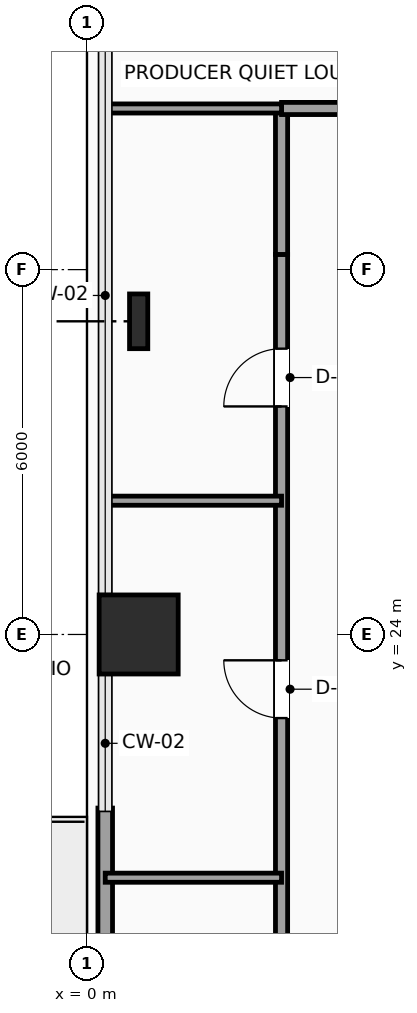
"""IFC4 building model, lengths in metres.
Left out: names, types, materials, properties, quantities, classifications, styles, units other than length and angle.
Written with IfcOpenShell. Run it as: python <this file> out.ifc"""

import sys

from ifc_helpers import new_model, si_unit, direction, frame, frame_2d, origin, origin_2d, place, context, subcontext, project, spatial, rectangle, i_section, extrude, element, fill, save


model = new_model("IFC4")
c1 = context("Model", 3, precision=1e-05, world=origin(), true_north=direction((0.0, 1.0)))
c2 = subcontext(c1, "Body", "Model", "MODEL_VIEW")
j1 = project(units=[si_unit("LENGTHUNIT", "METRE"), si_unit("PLANEANGLEUNIT", "RADIAN")], contexts=[c1])
p1 = place(None, origin())
s1 = spatial("IfcSite", under=j1, at=p1, CompositionType="ELEMENT")
p2 = place(p1, origin())
s2 = spatial("IfcBuilding", under=s1, at=p2, CompositionType="ELEMENT")
p3 = place(p2, frame((0.0, 0.0, 63.6)))
s3 = spatial("IfcBuildingStorey", under=s2, at=p3, CompositionType="ELEMENT", Elevation=63.6)
p4 = place(p3, frame((0.85, 24.0, 0.0), z_axis=(0.0, 0.0, 1.0), x_axis=(1.0, 0.0, 0.0)))
e1 = element("IfcColumn", 1, at=p4, inside=s3, PredefinedType="COLUMN", context=c2, shape_type="SweptSolid", body=[
    extrude(rectangle(XDim=1.3, YDim=1.3, at=origin_2d()), origin(), (0.0, 0.0, 1.0), 3.9),
])
p5 = place(p3, frame((0.85, 29.15, 0.0), z_axis=(0.0, 0.0, 1.0), x_axis=(1.0, 0.0, 0.0)))
e2 = element("IfcColumn", 2, at=p5, inside=s3, PredefinedType="COLUMN", context=c2, shape_type="SweptSolid", body=[
    extrude(i_section(OverallWidth=0.3, OverallDepth=0.9, WebThickness=0.019, FlangeThickness=0.035, FilletRadius=0.03, at=origin_2d()), origin(), (0.0, 0.0, 1.0), 3.9),
])
p6 = place(p3, frame((0.3, 11.855, 0.0), z_axis=(0.0, 0.0, 1.0), x_axis=(0.0, 1.0, 0.0)))
e3 = element("IfcWall", 3, at=p6, inside=s3, PredefinedType="SOLIDWALL", context=c2, shape_type="SweptSolid", body=[
    extrude(rectangle(XDim=9.29, YDim=0.24, at=frame_2d((4.645, 0.0))), origin(), (0.0, 0.0, 1.0), 3.65),
])
p7 = place(p6, frame((3.945, 0.0, 0.0)))
e4 = element("IfcOpeningElement", 4, at=p7, cuts=e3, PredefinedType="OPENING", context=c2, shape_type="SweptSolid", body=[
    extrude(rectangle(XDim=1.05, YDim=2.2, at=frame_2d((0.525, 1.1))), frame((0.0, 0.13, 0.0), z_axis=(0.0, -1.0, 0.0), x_axis=(1.0, 0.0, 0.0)), (0.0, 0.0, 1.0), 0.26),
])
p8 = place(p3, frame((3.2, 13.8, 0.0), z_axis=(0.0, 0.0, 1.0), x_axis=(0.0, 1.0, 0.0)))
e5 = element("IfcWall", 5, at=p8, inside=s3, PredefinedType="SOLIDWALL", context=c2, shape_type="SweptSolid", body=[
    extrude(rectangle(XDim=16.45, YDim=0.2, at=frame_2d((8.225, 0.0))), origin(), (0.0, 0.0, 1.0), 3.65),
])
p9 = place(p8, frame((2.625, 0.0, 0.0)))
e6 = element("IfcOpeningElement", 6, at=p9, cuts=e5, PredefinedType="OPENING", context=c2, shape_type="SweptSolid", body=[
    extrude(rectangle(XDim=0.95, YDim=2.15, at=frame_2d((0.475, 1.075))), frame((0.0, 0.11, 0.0), z_axis=(0.0, -1.0, 0.0), x_axis=(1.0, 0.0, 0.0)), (0.0, 0.0, 1.0), 0.22),
])
p10 = place(p8, frame((8.825, 0.0, 0.0)))
e7 = element("IfcOpeningElement", 7, at=p10, cuts=e5, PredefinedType="OPENING", context=c2, shape_type="SweptSolid", body=[
    extrude(rectangle(XDim=0.95, YDim=2.15, at=frame_2d((0.475, 1.075))), frame((0.0, 0.11, 0.0), z_axis=(0.0, -1.0, 0.0), x_axis=(1.0, 0.0, 0.0)), (0.0, 0.0, 1.0), 0.22),
])
p11 = place(p8, frame((13.95, 0.0, 0.0)))
e8 = element("IfcOpeningElement", 8, at=p11, cuts=e5, PredefinedType="OPENING", context=c2, shape_type="SweptSolid", body=[
    extrude(rectangle(XDim=0.95, YDim=2.15, at=frame_2d((0.475, 1.075))), frame((0.0, 0.11, 0.0), z_axis=(0.0, -1.0, 0.0), x_axis=(1.0, 0.0, 0.0)), (0.0, 0.0, 1.0), 0.22),
])
p12 = place(p3, frame((3.2, 30.25, 0.0), z_axis=(0.0, 0.0, 1.0), x_axis=(0.0, 1.0, 0.0)))
e9 = element("IfcWall", 9, at=p12, inside=s3, PredefinedType="SOLIDWALL", context=c2, shape_type="SweptSolid", body=[
    extrude(rectangle(XDim=2.4, YDim=0.2, at=frame_2d((1.2, 0.0))), origin(), (0.0, 0.0, 1.0), 3.65),
])
p13 = place(p3, frame((3.2, 32.65, 0.0), z_axis=(0.0, 0.0, 1.0), x_axis=(1.0, 0.0, 0.0)))
e10 = element("IfcWall", 10, at=p13, inside=s3, PredefinedType="SOLIDWALL", context=c2, shape_type="SweptSolid", body=[
    extrude(rectangle(XDim=2.05, YDim=0.2, at=frame_2d((1.025, 0.0))), origin(), (0.0, 0.0, 1.0), 3.65),
])
for number, where, z_axis, x_axis in (
    (11, (0.3, 20.0, 0.0), (0.0, 0.0, 1.0), (1.0, 0.0, 0.0)),
    (12, (0.3, 26.2, 0.0), (0.0, 0.0, 1.0), (1.0, 0.0, 0.0)),
    (13, (0.3, 32.65, 0.0), (0.0, 0.0, 1.0), (1.0, 0.0, 0.0)),
):
    element("IfcWall", number, at=place(p3, frame(where, z_axis=z_axis, x_axis=x_axis)), inside=s3, PredefinedType="PARTITIONING", context=c2, shape_type="SweptSolid", body=[
        extrude(rectangle(XDim=2.9, YDim=0.15, at=frame_2d((1.45, 0.0))), origin(), (0.0, 0.0, 1.0), 3.65),
    ])
p14 = place(p10, origin())
e14 = element("IfcDoor", 14, at=p14, inside=s3, OperationType="SINGLE_SWING_RIGHT", PredefinedType="DOOR", context=c2, shape_type="SweptSolid", body=[
    extrude(rectangle(XDim=0.95, YDim=2.15, at=frame_2d((0.475, 1.075))), frame((0.0, 0.025, 0.0), z_axis=(0.0, -1.0, 0.0), x_axis=(1.0, 0.0, 0.0)), (0.0, 0.0, 1.0), 0.05),
])
fill(e7, e14)
p15 = place(p11, origin())
e15 = element("IfcDoor", 15, at=p15, inside=s3, OperationType="SINGLE_SWING_LEFT", PredefinedType="DOOR", context=c2, shape_type="SweptSolid", body=[
    extrude(rectangle(XDim=0.95, YDim=2.15, at=frame_2d((0.475, 1.075))), frame((0.0, 0.025, 0.0), z_axis=(0.0, -1.0, 0.0), x_axis=(1.0, 0.0, 0.0)), (0.0, 0.0, 1.0), 0.05),
])
fill(e8, e15)
save(model, sys.argv[1])
